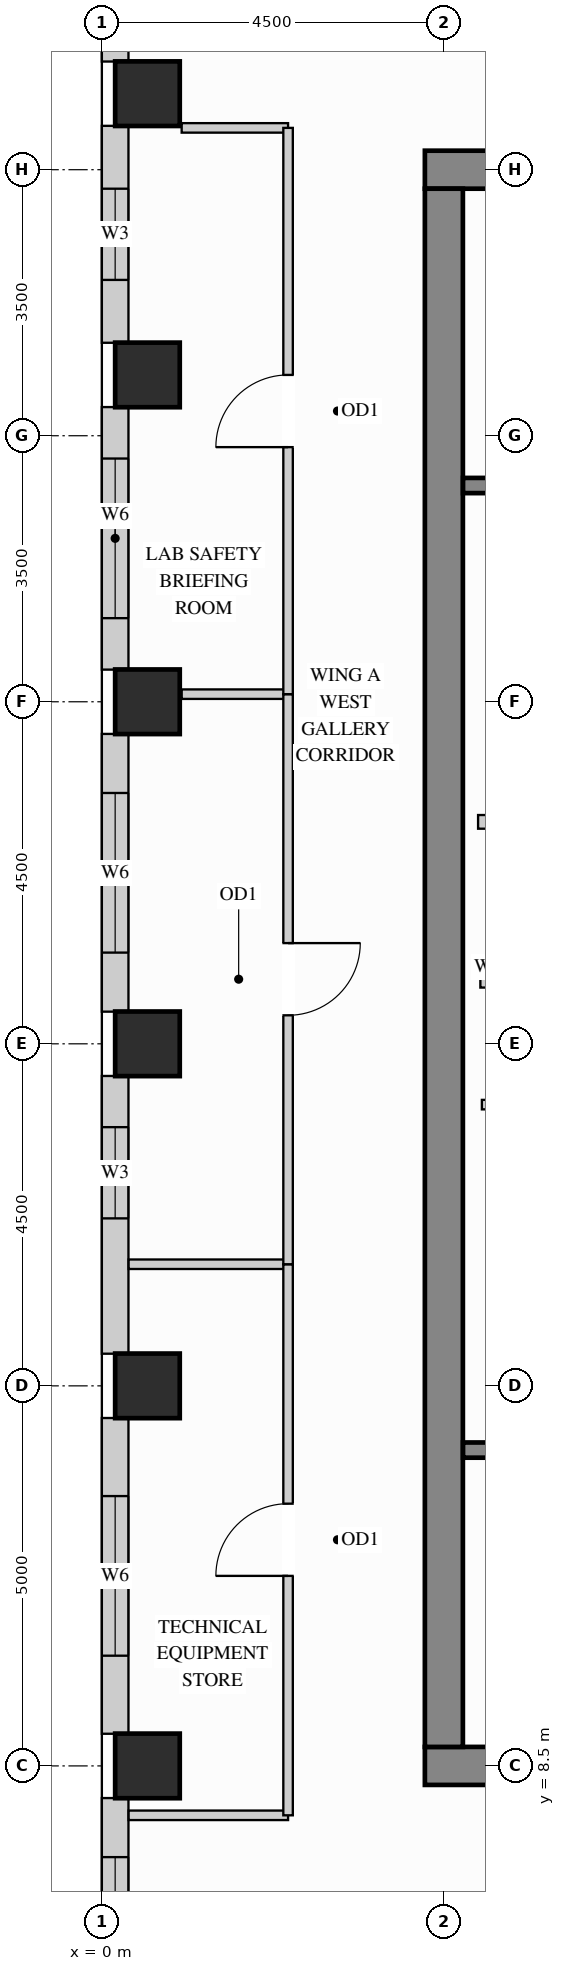
"""IFC4 building model, lengths in metres.
Left out: names, types, materials, properties, quantities, classifications, styles, units other than length and angle.
Written with IfcOpenShell. Run it as: python <this file> out.ifc"""

import sys

from ifc_helpers import new_model, si_unit, direction, frame, frame_2d, origin, origin_2d, place, context, subcontext, project, spatial, rectangle, extrude, source, transform, mapped, element, fill, save


model = new_model("IFC4")
c1 = context("Model", 3, precision=1e-05, world=origin(), true_north=direction((0.0, 1.0)))
c2 = subcontext(c1, "Body", "Model", "MODEL_VIEW")
j1 = project(units=[si_unit("LENGTHUNIT", "METRE"), si_unit("PLANEANGLEUNIT", "RADIAN")], contexts=[c1])
p1 = place(None, origin())
s1 = spatial("IfcSite", under=j1, at=p1, CompositionType="ELEMENT")
p2 = place(p1, origin())
s2 = spatial("IfcBuilding", under=s1, at=p2, CompositionType="ELEMENT")
p3 = place(p2, frame((0.0, 0.0, 252.0)))
s3 = spatial("IfcBuildingStorey", under=s2, at=p3, CompositionType="ELEMENT", Elevation=252.0)
m1 = source(origin(), c2, "Body", "SweptSolid", [
    extrude(rectangle(XDim=0.85, YDim=0.85, at=origin_2d()), origin(), (0.0, 0.0, 1.0), 3.4),
])
for number, where, z_axis, x_axis in (
    (1, (0.6, 13.5, 0.0), (0.0, 0.0, 1.0), (1.0, 0.0, 0.0)),
    (2, (0.6, 18.0, 0.0), (0.0, 0.0, 1.0), (1.0, 0.0, 0.0)),
    (3, (0.6, 22.5, 0.0), (0.0, 0.0, 1.0), (1.0, 0.0, 0.0)),
    (4, (0.6, 26.8, 0.0), (0.0, 0.0, 1.0), (1.0, 0.0, 0.0)),
    (5, (0.6, 30.5, 0.0), (0.0, 0.0, 1.0), (1.0, 0.0, 0.0)),
    (6, (0.6, 8.5, 0.0), (0.0, 0.0, 1.0), (1.0, 0.0, 0.0)),
):
    element("IfcColumn", number, at=place(p3, frame(where, z_axis=z_axis, x_axis=x_axis)), inside=s3, PredefinedType="COLUMN", context=c2, shape_type="MappedRepresentation", body=[
        mapped(m1, transform((0.0, 0.0, 0.0), x_axis=(1.0, 0.0, 0.0), y_axis=(0.0, 1.0, 0.0), z_axis=(0.0, 0.0, 1.0))),
    ])
m2 = source(origin(), c2, "Body", "SweptSolid", [
    extrude(rectangle(XDim=10.5, YDim=0.5, at=frame_2d((5.25, 0.0))), origin(), (0.0, 0.0, 1.0), 3.4),
])
for number, where, z_axis, x_axis in (
    (7, (4.25, 29.5, 0.0), (0.0, 0.0, 1.0), (1.0, 0.0, 0.0)),
    (8, (4.25, 8.5, 0.0), (0.0, 0.0, 1.0), (1.0, 0.0, 0.0)),
):
    element("IfcWall", number, at=place(p3, frame(where, z_axis=z_axis, x_axis=x_axis)), inside=s3, PredefinedType="SHEAR", context=c2, shape_type="MappedRepresentation", body=[
        mapped(m2, transform((0.0, 0.0, 0.0), x_axis=(1.0, 0.0, 0.0), y_axis=(0.0, 1.0, 0.0), z_axis=(0.0, 0.0, 1.0))),
    ])
m3 = source(origin(), c2, "Body", "SweptSolid", [
    extrude(rectangle(XDim=20.5, YDim=0.5, at=frame_2d((10.25, 0.0))), origin(), (0.0, 0.0, 1.0), 3.4),
])
p4 = place(p3, frame((4.5, 8.75, 0.0), z_axis=(0.0, 0.0, 1.0), x_axis=(0.0, 1.0, 0.0)))
e9 = element("IfcWall", 9, at=p4, inside=s3, PredefinedType="SHEAR", context=c2, shape_type="MappedRepresentation", body=[
    mapped(m3, transform((0.0, 0.0, 0.0), x_axis=(1.0, 0.0, 0.0), y_axis=(0.0, 1.0, 0.0), z_axis=(0.0, 0.0, 1.0))),
])
m4 = source(origin(), c2, "Body", "SweptSolid", [
    extrude(rectangle(XDim=0.527, YDim=0.35, at=frame_2d((0.263, 0.0))), origin(), (0.0, 0.0, 1.0), 3.385),
])
p5 = place(p3, frame((0.175, 31.45, 0.0), z_axis=(0.0, 0.0, 1.0), x_axis=(0.0, -1.0, 0.0)))
e10 = element("IfcWall", 10, at=p5, inside=s3, PredefinedType="SOLIDWALL", context=c2, shape_type="MappedRepresentation", body=[
    mapped(m4, transform((0.0, 0.0, 0.0), x_axis=(1.0, 0.0, 0.0), y_axis=(0.0, 1.0, 0.0), z_axis=(0.0, 0.0, 1.0))),
])
p6 = place(p3, frame((0.175, 30.077, 0.0), z_axis=(0.0, 0.0, 1.0), x_axis=(0.0, -1.0, 0.0)))
e11 = element("IfcWall", 11, at=p6, inside=s3, PredefinedType="SOLIDWALL", context=c2, shape_type="SweptSolid", body=[
    extrude(rectangle(XDim=2.854, YDim=0.35, at=frame_2d((1.427, 0.0))), origin(), (0.0, 0.0, 1.0), 3.385),
])
p7 = place(p6, frame((0.827, 0.0, 0.78)))
e12 = element("IfcOpeningElement", 12, at=p7, cuts=e11, PredefinedType="OPENING", context=c2, shape_type="SweptSolid", body=[
    extrude(rectangle(XDim=1.2, YDim=2.25, at=frame_2d((0.6, 1.125))), frame((0.0, 0.185, 0.0), z_axis=(0.0, -1.0, 0.0), x_axis=(1.0, 0.0, 0.0)), (0.0, 0.0, 1.0), 0.37),
])
p8 = place(p3, frame((0.175, 26.377, 0.0), z_axis=(0.0, 0.0, 1.0), x_axis=(0.0, -1.0, 0.0)))
e13 = element("IfcWall", 13, at=p8, inside=s3, PredefinedType="SOLIDWALL", context=c2, shape_type="SweptSolid", body=[
    extrude(rectangle(XDim=3.454, YDim=0.35, at=frame_2d((1.727, 0.0))), origin(), (0.0, 0.0, 1.0), 3.385),
])
p9 = place(p8, frame((0.677, 0.0, 0.78)))
e14 = element("IfcOpeningElement", 14, at=p9, cuts=e13, PredefinedType="OPENING", context=c2, shape_type="SweptSolid", body=[
    extrude(rectangle(XDim=2.1, YDim=2.25, at=frame_2d((1.05, 1.125))), frame((0.0, 0.185, 0.0), z_axis=(0.0, -1.0, 0.0), x_axis=(1.0, 0.0, 0.0)), (0.0, 0.0, 1.0), 0.37),
])
p10 = place(p3, frame((0.175, 22.077, 0.0), z_axis=(0.0, 0.0, 1.0), x_axis=(0.0, -1.0, 0.0)))
e15 = element("IfcWall", 15, at=p10, inside=s3, PredefinedType="SOLIDWALL", context=c2, shape_type="SweptSolid", body=[
    extrude(rectangle(XDim=3.654, YDim=0.35, at=frame_2d((1.827, 0.0))), origin(), (0.0, 0.0, 1.0), 3.385),
])
p11 = place(p10, frame((0.777, 0.0, 0.78)))
e16 = element("IfcOpeningElement", 16, at=p11, cuts=e15, PredefinedType="OPENING", context=c2, shape_type="SweptSolid", body=[
    extrude(rectangle(XDim=2.1, YDim=2.25, at=frame_2d((1.05, 1.125))), frame((0.0, 0.185, 0.0), z_axis=(0.0, -1.0, 0.0), x_axis=(1.0, 0.0, 0.0)), (0.0, 0.0, 1.0), 0.37),
])
p12 = place(p3, frame((0.175, 17.577, 0.0), z_axis=(0.0, 0.0, 1.0), x_axis=(0.0, -1.0, 0.0)))
e17 = element("IfcWall", 17, at=p12, inside=s3, PredefinedType="SOLIDWALL", context=c2, shape_type="SweptSolid", body=[
    extrude(rectangle(XDim=3.654, YDim=0.35, at=frame_2d((1.827, 0.0))), origin(), (0.0, 0.0, 1.0), 3.385),
])
p13 = place(p12, frame((0.674, 0.0, 0.78)))
e18 = element("IfcOpeningElement", 18, at=p13, cuts=e17, PredefinedType="OPENING", context=c2, shape_type="SweptSolid", body=[
    extrude(rectangle(XDim=1.2, YDim=2.25, at=frame_2d((0.6, 1.125))), frame((0.0, 0.185, 0.0), z_axis=(0.0, -1.0, 0.0), x_axis=(1.0, 0.0, 0.0)), (0.0, 0.0, 1.0), 0.37),
])
p14 = place(p3, frame((0.175, 13.077, 0.0), z_axis=(0.0, 0.0, 1.0), x_axis=(0.0, -1.0, 0.0)))
e19 = element("IfcWall", 19, at=p14, inside=s3, PredefinedType="SOLIDWALL", context=c2, shape_type="SweptSolid", body=[
    extrude(rectangle(XDim=4.154, YDim=0.35, at=frame_2d((2.077, 0.0))), origin(), (0.0, 0.0, 1.0), 3.385),
])
p15 = place(p14, frame((1.027, 0.0, 0.78)))
e20 = element("IfcOpeningElement", 20, at=p15, cuts=e19, PredefinedType="OPENING", context=c2, shape_type="SweptSolid", body=[
    extrude(rectangle(XDim=2.1, YDim=2.25, at=frame_2d((1.05, 1.125))), frame((0.0, 0.185, 0.0), z_axis=(0.0, -1.0, 0.0), x_axis=(1.0, 0.0, 0.0)), (0.0, 0.0, 1.0), 0.37),
])
p16 = place(p3, frame((0.175, 8.077, 0.0), z_axis=(0.0, 0.0, 1.0), x_axis=(0.0, -1.0, 0.0)))
e21 = element("IfcWall", 21, at=p16, inside=s3, PredefinedType="SOLIDWALL", context=c2, shape_type="SweptSolid", body=[
    extrude(rectangle(XDim=4.154, YDim=0.35, at=frame_2d((2.077, 0.0))), origin(), (0.0, 0.0, 1.0), 3.385),
])
p17 = place(p16, frame((0.777, 0.0, 0.78)))
e22 = element("IfcOpeningElement", 22, at=p17, cuts=e21, PredefinedType="OPENING", context=c2, shape_type="SweptSolid", body=[
    extrude(rectangle(XDim=2.1, YDim=2.25, at=frame_2d((1.05, 1.125))), frame((0.0, 0.185, 0.0), z_axis=(0.0, -1.0, 0.0), x_axis=(1.0, 0.0, 0.0)), (0.0, 0.0, 1.0), 0.37),
])
m5 = source(origin(), c2, "Body", "SweptSolid", [
    extrude(rectangle(XDim=2.2, YDim=0.18, at=frame_2d((1.1, 0.0))), origin(), (0.0, 0.0, 1.0), 3.385),
])
p18 = place(p3, frame((4.95, 20.92, 0.0), z_axis=(0.0, 0.0, 1.0), x_axis=(1.0, 0.0, 0.0)))
e23 = element("IfcWall", 23, at=p18, inside=s3, PredefinedType="PARTITIONING", context=c2, shape_type="MappedRepresentation", body=[
    mapped(m5, transform((0.0, 0.0, 0.0), x_axis=(1.0, 0.0, 0.0), y_axis=(0.0, 1.0, 0.0), z_axis=(0.0, 0.0, 1.0))),
])
p19 = place(p3, frame((5.0, 17.2, 0.0), z_axis=(0.0, 0.0, 1.0), x_axis=(1.0, 0.0, 0.0)))
e24 = element("IfcWall", 24, at=p19, inside=s3, PredefinedType="PARTITIONING", context=c2, shape_type="SweptSolid", body=[
    extrude(rectangle(XDim=2.4, YDim=0.125, at=frame_2d((1.2, 0.0))), origin(), (0.0, 0.0, 1.0), 3.385),
])
p20 = place(p19, frame((0.7, 0.0, 0.0)))
e25 = element("IfcOpeningElement", 25, at=p20, cuts=e24, PredefinedType="OPENING", context=c2, shape_type="SweptSolid", body=[
    extrude(rectangle(XDim=0.85, YDim=2.1, at=frame_2d((0.425, 1.05))), frame((0.0, 0.073, 0.0), z_axis=(0.0, -1.0, 0.0), x_axis=(1.0, 0.0, 0.0)), (0.0, 0.0, 1.0), 0.145),
])
m6 = source(origin(), c2, "Body", "SweptSolid", [
    extrude(rectangle(XDim=1.4, YDim=0.125, at=frame_2d((0.7, 0.0))), origin(), (0.0, 0.0, 1.0), 3.385),
])
p21 = place(p3, frame((1.05, 30.05, 0.0), z_axis=(0.0, 0.0, 1.0), x_axis=(1.0, 0.0, 0.0)))
e26 = element("IfcWall", 26, at=p21, inside=s3, PredefinedType="PARTITIONING", context=c2, shape_type="MappedRepresentation", body=[
    mapped(m6, transform((0.0, 0.0, 0.0), x_axis=(1.0, 0.0, 0.0), y_axis=(0.0, 1.0, 0.0), z_axis=(0.0, 0.0, 1.0))),
])
m7 = source(origin(), c2, "Body", "SweptSolid", [
    extrude(rectangle(XDim=2.098, YDim=0.125, at=frame_2d((1.049, 0.0))), origin(), (0.0, 0.0, 1.0), 3.385),
])
for number, where, z_axis, x_axis in (
    (27, (0.352, 7.85, 0.0), (0.0, 0.0, 1.0), (1.0, 0.0, 0.0)),
    (28, (0.352, 15.1, 0.0), (0.0, 0.0, 1.0), (1.0, 0.0, 0.0)),
):
    element("IfcWall", number, at=place(p3, frame(where, z_axis=z_axis, x_axis=x_axis)), inside=s3, PredefinedType="PARTITIONING", context=c2, shape_type="MappedRepresentation", body=[
        mapped(m7, transform((0.0, 0.0, 0.0), x_axis=(1.0, 0.0, 0.0), y_axis=(0.0, 1.0, 0.0), z_axis=(0.0, 0.0, 1.0))),
    ])
p22 = place(p3, frame((1.05, 22.6, 0.0), z_axis=(0.0, 0.0, 1.0), x_axis=(1.0, 0.0, 0.0)))
e29 = element("IfcWall", 29, at=p22, inside=s3, PredefinedType="PARTITIONING", context=c2, shape_type="MappedRepresentation", body=[
    mapped(m6, transform((0.0, 0.0, 0.0), x_axis=(1.0, 0.0, 0.0), y_axis=(0.0, 1.0, 0.0), z_axis=(0.0, 0.0, 1.0))),
])
p23 = place(p3, frame((2.45, 7.85, 0.0), z_axis=(0.0, 0.0, 1.0), x_axis=(0.0, 1.0, 0.0)))
e30 = element("IfcWall", 30, at=p23, inside=s3, PredefinedType="PARTITIONING", context=c2, shape_type="SweptSolid", body=[
    extrude(rectangle(XDim=7.25, YDim=0.125, at=frame_2d((3.625, 0.0))), origin(), (0.0, 0.0, 1.0), 3.385),
])
p24 = place(p23, frame((3.15, 0.0, 0.0)))
e31 = element("IfcOpeningElement", 31, at=p24, cuts=e30, PredefinedType="OPENING", context=c2, shape_type="SweptSolid", body=[
    extrude(rectangle(XDim=0.95, YDim=2.15, at=frame_2d((0.475, 1.075))), frame((0.0, 0.073, 0.0), z_axis=(0.0, -1.0, 0.0), x_axis=(1.0, 0.0, 0.0)), (0.0, 0.0, 1.0), 0.145),
])
p25 = place(p3, frame((2.45, 15.1, 0.0), z_axis=(0.0, 0.0, 1.0), x_axis=(0.0, 1.0, 0.0)))
e32 = element("IfcWall", 32, at=p25, inside=s3, PredefinedType="PARTITIONING", context=c2, shape_type="SweptSolid", body=[
    extrude(rectangle(XDim=7.5, YDim=0.125, at=frame_2d((3.75, 0.0))), origin(), (0.0, 0.0, 1.0), 3.385),
])
p26 = place(p25, frame((3.275, 0.0, 0.0)))
e33 = element("IfcOpeningElement", 33, at=p26, cuts=e32, PredefinedType="OPENING", context=c2, shape_type="SweptSolid", body=[
    extrude(rectangle(XDim=0.95, YDim=2.15, at=frame_2d((0.475, 1.075))), frame((0.0, 0.073, 0.0), z_axis=(0.0, -1.0, 0.0), x_axis=(1.0, 0.0, 0.0)), (0.0, 0.0, 1.0), 0.145),
])
p27 = place(p3, frame((2.45, 22.6, 0.0), z_axis=(0.0, 0.0, 1.0), x_axis=(0.0, 1.0, 0.0)))
e34 = element("IfcWall", 34, at=p27, inside=s3, PredefinedType="PARTITIONING", context=c2, shape_type="SweptSolid", body=[
    extrude(rectangle(XDim=7.45, YDim=0.125, at=frame_2d((3.725, 0.0))), origin(), (0.0, 0.0, 1.0), 3.385),
])
p28 = place(p27, frame((3.25, 0.0, 0.0)))
e35 = element("IfcOpeningElement", 35, at=p28, cuts=e34, PredefinedType="OPENING", context=c2, shape_type="SweptSolid", body=[
    extrude(rectangle(XDim=0.95, YDim=2.15, at=frame_2d((0.475, 1.075))), frame((0.0, 0.073, 0.0), z_axis=(0.0, -1.0, 0.0), x_axis=(1.0, 0.0, 0.0)), (0.0, 0.0, 1.0), 0.145),
])
m8 = source(origin(), c2, "Body", "SweptSolid", [
    extrude(rectangle(XDim=2.09, YDim=0.2, at=frame_2d((1.045, 0.0))), origin(), (0.0, 0.0, 1.0), 3.385),
])
p29 = place(p3, frame((4.98, 18.84, 0.0), z_axis=(0.0, 0.0, 1.0), x_axis=(1.0, 0.0, 0.0)))
e36 = element("IfcWall", 36, at=p29, inside=s3, PredefinedType="PARTITIONING", context=c2, shape_type="MappedRepresentation", body=[
    mapped(m8, transform((0.0, 0.0, 0.0), x_axis=(1.0, 0.0, 0.0), y_axis=(0.0, 1.0, 0.0), z_axis=(0.0, 0.0, 1.0))),
])
p30 = place(p3, frame((4.752, 12.655, 0.0), z_axis=(0.0, 0.0, 1.0), x_axis=(1.0, 0.0, 0.0)))
e37 = element("IfcWall", 37, at=p30, inside=s3, PredefinedType="SHEAR", context=c2, shape_type="SweptSolid", body=[
    extrude(rectangle(XDim=7.653, YDim=0.2, at=frame_2d((3.827, 0.0))), origin(), (0.0, 0.0, 1.0), 3.4),
])
p31 = place(p30, frame((0.4, 0.0, 0.0)))
e38 = element("IfcOpeningElement", 38, at=p31, cuts=e37, PredefinedType="OPENING", context=c2, shape_type="SweptSolid", body=[
    extrude(rectangle(XDim=1.1, YDim=2.15, at=frame_2d((0.55, 1.075))), frame((0.0, 0.11, 0.0), z_axis=(0.0, -1.0, 0.0), x_axis=(1.0, 0.0, 0.0)), (0.0, 0.0, 1.0), 0.22),
])
p32 = place(p3, frame((4.752, 25.345, 0.0), z_axis=(0.0, 0.0, 1.0), x_axis=(1.0, 0.0, 0.0)))
e39 = element("IfcWall", 39, at=p32, inside=s3, PredefinedType="SHEAR", context=c2, shape_type="SweptSolid", body=[
    extrude(rectangle(XDim=7.653, YDim=0.2, at=frame_2d((3.827, 0.0))), origin(), (0.0, 0.0, 1.0), 3.4),
])
p33 = place(p32, frame((0.4, 0.0, 0.0)))
e40 = element("IfcOpeningElement", 40, at=p33, cuts=e39, PredefinedType="OPENING", context=c2, shape_type="SweptSolid", body=[
    extrude(rectangle(XDim=1.1, YDim=2.15, at=frame_2d((0.55, 1.075))), frame((0.0, 0.11, 0.0), z_axis=(0.0, -1.0, 0.0), x_axis=(1.0, 0.0, 0.0)), (0.0, 0.0, 1.0), 0.22),
])
m9 = source(origin(), c2, "Body", "SweptSolid", [
    extrude(rectangle(XDim=0.95, YDim=2.15, at=frame_2d((0.475, 1.075))), frame((0.0, 0.025, 0.0), z_axis=(0.0, -1.0, 0.0), x_axis=(1.0, 0.0, 0.0)), (0.0, 0.0, 1.0), 0.05),
])
p34 = place(p24, origin())
e41 = element("IfcDoor", 41, at=p34, inside=s3, OperationType="SINGLE_SWING_LEFT", PredefinedType="DOOR", context=c2, shape_type="MappedRepresentation", body=[
    mapped(m9, transform((0.0, 0.0, 0.0), x_axis=(1.0, 0.0, 0.0), y_axis=(0.0, 1.0, 0.0), z_axis=(0.0, 0.0, 1.0))),
])
fill(e31, e41)
p35 = place(p26, origin())
e42 = element("IfcDoor", 42, at=p35, inside=s3, OperationType="SINGLE_SWING_RIGHT", PredefinedType="DOOR", context=c2, shape_type="MappedRepresentation", body=[
    mapped(m9, transform((0.0, 0.0, 0.0), x_axis=(1.0, 0.0, 0.0), y_axis=(0.0, 1.0, 0.0), z_axis=(0.0, 0.0, 1.0))),
])
fill(e33, e42)
p36 = place(p28, origin())
e43 = element("IfcDoor", 43, at=p36, inside=s3, OperationType="SINGLE_SWING_LEFT", PredefinedType="DOOR", context=c2, shape_type="MappedRepresentation", body=[
    mapped(m9, transform((0.0, 0.0, 0.0), x_axis=(1.0, 0.0, 0.0), y_axis=(0.0, 1.0, 0.0), z_axis=(0.0, 0.0, 1.0))),
])
fill(e35, e43)
m10 = source(origin(), c2, "Body", "SweptSolid", [
    extrude(rectangle(XDim=1.2, YDim=2.25, at=frame_2d((0.6, 1.125))), frame((0.0, 0.03, 0.0), z_axis=(0.0, -1.0, 0.0), x_axis=(1.0, 0.0, 0.0)), (0.0, 0.0, 1.0), 0.06),
])
p37 = place(p7, origin())
e44 = element("IfcWindow", 44, at=p37, inside=s3, PartitioningType="SINGLE_PANEL", PredefinedType="WINDOW", context=c2, shape_type="MappedRepresentation", body=[
    mapped(m10, transform((0.0, 0.0, 0.0), x_axis=(1.0, 0.0, 0.0), y_axis=(0.0, 1.0, 0.0), z_axis=(0.0, 0.0, 1.0))),
])
fill(e12, e44)
p38 = place(p13, origin())
e45 = element("IfcWindow", 45, at=p38, inside=s3, PartitioningType="SINGLE_PANEL", PredefinedType="WINDOW", context=c2, shape_type="MappedRepresentation", body=[
    mapped(m10, transform((0.0, 0.0, 0.0), x_axis=(1.0, 0.0, 0.0), y_axis=(0.0, 1.0, 0.0), z_axis=(0.0, 0.0, 1.0))),
])
fill(e18, e45)
m11 = source(origin(), c2, "Body", "SweptSolid", [
    extrude(rectangle(XDim=2.1, YDim=2.25, at=frame_2d((1.05, 1.125))), frame((0.0, 0.03, 0.0), z_axis=(0.0, -1.0, 0.0), x_axis=(1.0, 0.0, 0.0)), (0.0, 0.0, 1.0), 0.06),
])
p39 = place(p9, origin())
e46 = element("IfcWindow", 46, at=p39, inside=s3, PartitioningType="SINGLE_PANEL", PredefinedType="WINDOW", context=c2, shape_type="MappedRepresentation", body=[
    mapped(m11, transform((0.0, 0.0, 0.0), x_axis=(1.0, 0.0, 0.0), y_axis=(0.0, 1.0, 0.0), z_axis=(0.0, 0.0, 1.0))),
])
fill(e14, e46)
p40 = place(p11, origin())
e47 = element("IfcWindow", 47, at=p40, inside=s3, PartitioningType="SINGLE_PANEL", PredefinedType="WINDOW", context=c2, shape_type="MappedRepresentation", body=[
    mapped(m11, transform((0.0, 0.0, 0.0), x_axis=(1.0, 0.0, 0.0), y_axis=(0.0, 1.0, 0.0), z_axis=(0.0, 0.0, 1.0))),
])
fill(e16, e47)
p41 = place(p15, origin())
e48 = element("IfcWindow", 48, at=p41, inside=s3, PartitioningType="SINGLE_PANEL", PredefinedType="WINDOW", context=c2, shape_type="MappedRepresentation", body=[
    mapped(m11, transform((0.0, 0.0, 0.0), x_axis=(1.0, 0.0, 0.0), y_axis=(0.0, 1.0, 0.0), z_axis=(0.0, 0.0, 1.0))),
])
fill(e20, e48)
p42 = place(p17, origin())
e49 = element("IfcWindow", 49, at=p42, inside=s3, PartitioningType="SINGLE_PANEL", PredefinedType="WINDOW", context=c2, shape_type="MappedRepresentation", body=[
    mapped(m11, transform((0.0, 0.0, 0.0), x_axis=(1.0, 0.0, 0.0), y_axis=(0.0, 1.0, 0.0), z_axis=(0.0, 0.0, 1.0))),
])
fill(e22, e49)
save(model, sys.argv[1])
